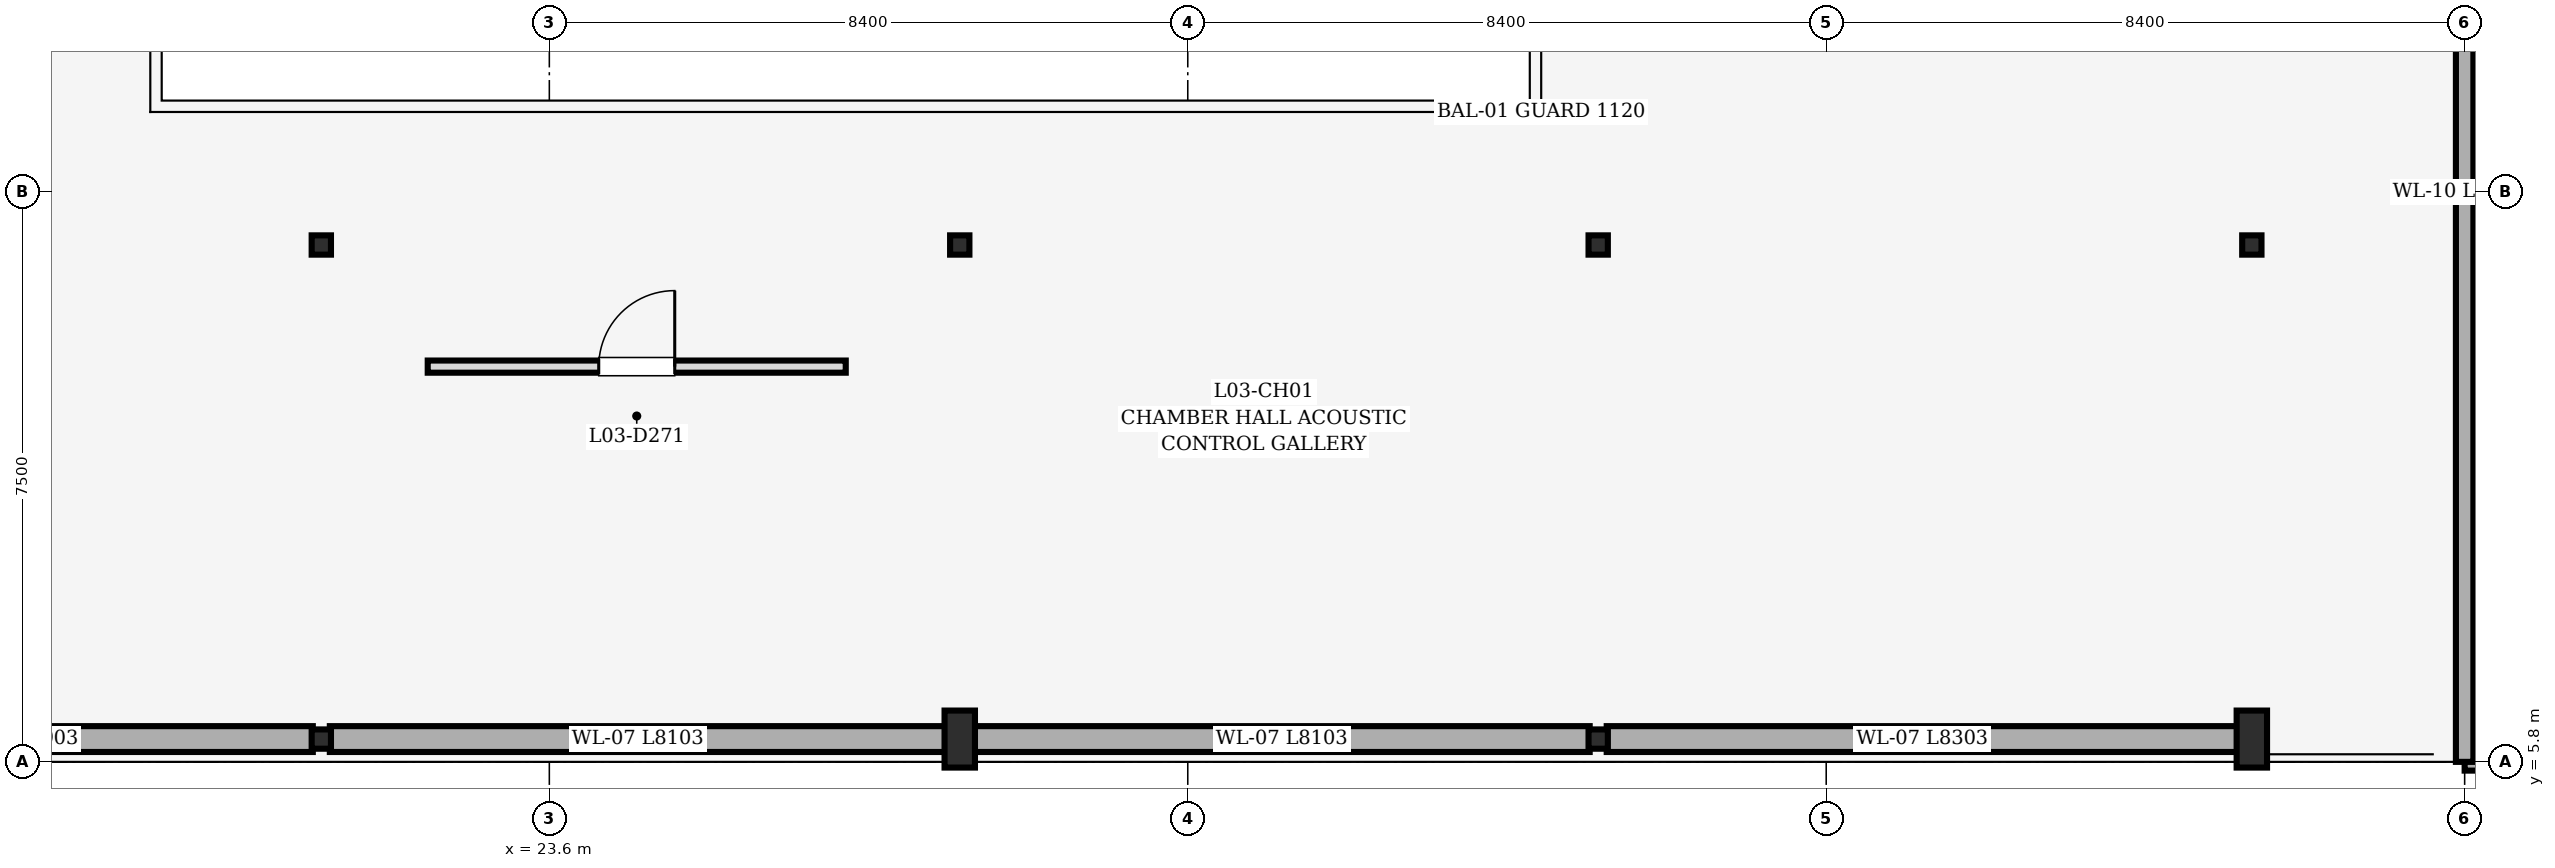
"""IFC4 building model, lengths in metres.
Left out: names, types, materials, properties, quantities, classifications, styles, units other than length and angle.
Written with IfcOpenShell. Run it as: python <this file> out.ifc"""

import sys

from ifc_helpers import new_model, si_unit, direction, frame, frame_2d, origin, origin_2d, place, context, subcontext, project, spatial, rectangle, i_section, extrude, element, fill, save


model = new_model("IFC4")
c1 = context("Model", 3, precision=1e-05, world=origin(), true_north=direction((0.0, 1.0)))
c2 = subcontext(c1, "Body", "Model", "MODEL_VIEW")
j1 = project(units=[si_unit("LENGTHUNIT", "METRE"), si_unit("PLANEANGLEUNIT", "RADIAN")], contexts=[c1])
p1 = place(None, origin())
s1 = spatial("IfcSite", under=j1, at=p1, CompositionType="ELEMENT")
p2 = place(p1, origin())
s2 = spatial("IfcBuilding", under=s1, at=p2, CompositionType="ELEMENT")
p3 = place(p2, frame((0.0, 0.0, 10.2)))
s3 = spatial("IfcBuildingStorey", under=s2, at=p3, CompositionType="ELEMENT", Elevation=10.2)
for number, where, z_axis, x_axis in (
    (1, (20.6, 6.1, 0.0), (0.0, 0.0, 1.0), (1.0, 0.0, 0.0)),
    (2, (20.6, 12.6, 0.0), (0.0, 0.0, 1.0), (1.0, 0.0, 0.0)),
):
    element("IfcColumn", number, at=place(p3, frame(where, z_axis=z_axis, x_axis=x_axis)), inside=s3, PredefinedType="COLUMN", context=c2, shape_type="SweptSolid", body=[
        extrude(i_section(OverallWidth=0.254, OverallDepth=0.254, WebThickness=0.009, FlangeThickness=0.014, at=origin_2d()), origin(), (0.0, 0.0, 1.0), 4.5),
    ])
p4 = place(p3, frame((29.0, 6.1, 0.0), z_axis=(0.0, 0.0, 1.0), x_axis=(1.0, 0.0, 0.0)))
e3 = element("IfcColumn", 3, at=p4, inside=s3, PredefinedType="PILASTER", context=c2, shape_type="SweptSolid", body=[
    extrude(rectangle(XDim=0.4, YDim=0.75, at=origin_2d()), origin(), (0.0, 0.0, 1.0), 4.5),
])
for number, where, z_axis, x_axis in (
    (4, (29.0, 12.6, 0.0), (0.0, 0.0, 1.0), (1.0, 0.0, 0.0)),
    (5, (37.4, 6.1, 0.0), (0.0, 0.0, 1.0), (1.0, 0.0, 0.0)),
    (6, (37.4, 12.6, 0.0), (0.0, 0.0, 1.0), (1.0, 0.0, 0.0)),
):
    element("IfcColumn", number, at=place(p3, frame(where, z_axis=z_axis, x_axis=x_axis)), inside=s3, PredefinedType="COLUMN", context=c2, shape_type="SweptSolid", body=[
        extrude(i_section(OverallWidth=0.254, OverallDepth=0.254, WebThickness=0.009, FlangeThickness=0.014, at=origin_2d()), origin(), (0.0, 0.0, 1.0), 4.5),
    ])
p5 = place(p3, frame((46.0, 6.1, 0.0), z_axis=(0.0, 0.0, 1.0), x_axis=(1.0, 0.0, 0.0)))
e7 = element("IfcColumn", 7, at=p5, inside=s3, PredefinedType="PILASTER", context=c2, shape_type="SweptSolid", body=[
    extrude(rectangle(XDim=0.4, YDim=0.75, at=origin_2d()), origin(), (0.0, 0.0, 1.0), 4.5),
])
p6 = place(p3, frame((46.0, 12.6, 0.0), z_axis=(0.0, 0.0, 1.0), x_axis=(1.0, 0.0, 0.0)))
e8 = element("IfcColumn", 8, at=p6, inside=s3, PredefinedType="COLUMN", context=c2, shape_type="SweptSolid", body=[
    extrude(i_section(OverallWidth=0.254, OverallDepth=0.254, WebThickness=0.009, FlangeThickness=0.014, at=origin_2d()), origin(), (0.0, 0.0, 1.0), 4.5),
])
p7 = place(p3, frame((20.488, 6.1, 0.0), z_axis=(0.0, 0.0, 1.0), x_axis=(-1.0, 0.0, 0.0)))
e9 = element("IfcWall", 9, at=p7, inside=s3, PredefinedType="STANDARD", context=c2, shape_type="SweptSolid", body=[
    extrude(rectangle(XDim=7.903, YDim=0.34, at=frame_2d((3.952, 0.0))), origin(), (0.0, 0.0, 1.0), 3.527),
])
p8 = place(p7, frame((3.376, 0.0, 0.85)))
e10 = element("IfcOpeningElement", 10, at=p8, cuts=e9, PredefinedType="OPENING", context=c2, shape_type="SweptSolid", body=[
    extrude(rectangle(XDim=1.15, YDim=1.95, at=frame_2d((0.575, 0.975))), frame((0.0, 0.182, 0.0), z_axis=(0.0, -1.0, 0.0), x_axis=(1.0, 0.0, 0.0)), (0.0, 0.0, 1.0), 0.364),
])
p9 = place(p3, frame((28.815, 6.1, 0.0), z_axis=(0.0, 0.0, 1.0), x_axis=(-1.0, 0.0, 0.0)))
e11 = element("IfcWall", 11, at=p9, inside=s3, PredefinedType="STANDARD", context=c2, shape_type="SweptSolid", body=[
    extrude(rectangle(XDim=8.103, YDim=0.34, at=frame_2d((4.052, 0.0))), origin(), (0.0, 0.0, 1.0), 3.477),
])
p10 = place(p9, frame((3.602, 0.0, 0.85)))
e12 = element("IfcOpeningElement", 12, at=p10, cuts=e11, PredefinedType="OPENING", context=c2, shape_type="SweptSolid", body=[
    extrude(rectangle(XDim=0.9, YDim=1.75, at=frame_2d((0.45, 0.875))), frame((0.0, 0.182, 0.0), z_axis=(0.0, -1.0, 0.0), x_axis=(1.0, 0.0, 0.0)), (0.0, 0.0, 1.0), 0.364),
])
p11 = place(p3, frame((37.288, 6.1, 0.0), z_axis=(0.0, 0.0, 1.0), x_axis=(-1.0, 0.0, 0.0)))
e13 = element("IfcWall", 13, at=p11, inside=s3, PredefinedType="STANDARD", context=c2, shape_type="SweptSolid", body=[
    extrude(rectangle(XDim=8.103, YDim=0.34, at=frame_2d((4.052, 0.0))), origin(), (0.0, 0.0, 1.0), 3.477),
])
p12 = place(p11, frame((3.491, 0.0, 0.85)))
e14 = element("IfcOpeningElement", 14, at=p12, cuts=e13, PredefinedType="OPENING", context=c2, shape_type="SweptSolid", body=[
    extrude(rectangle(XDim=1.12, YDim=1.75, at=frame_2d((0.56, 0.875))), frame((0.0, 0.182, 0.0), z_axis=(0.0, -1.0, 0.0), x_axis=(1.0, 0.0, 0.0)), (0.0, 0.0, 1.0), 0.364),
])
p13 = place(p3, frame((45.815, 6.1, 0.0), z_axis=(0.0, 0.0, 1.0), x_axis=(-1.0, 0.0, 0.0)))
e15 = element("IfcWall", 15, at=p13, inside=s3, PredefinedType="STANDARD", context=c2, shape_type="SweptSolid", body=[
    extrude(rectangle(XDim=8.303, YDim=0.34, at=frame_2d((4.151, 0.0))), origin(), (0.0, 0.0, 1.0), 3.477),
])
p14 = place(p13, frame((3.292, 0.0, 0.85)))
e16 = element("IfcOpeningElement", 16, at=p14, cuts=e15, PredefinedType="OPENING", context=c2, shape_type="SweptSolid", body=[
    extrude(rectangle(XDim=1.72, YDim=1.75, at=frame_2d((0.86, 0.875))), frame((0.0, 0.182, 0.0), z_axis=(0.0, -1.0, 0.0), x_axis=(1.0, 0.0, 0.0)), (0.0, 0.0, 1.0), 0.364),
])
p15 = place(p3, frame((96.0, 5.8, -0.12), z_axis=(0.0, 0.0, 1.0), x_axis=(-1.0, 0.0, 0.0)))
e17 = element("IfcWall", 17, at=p15, inside=s3, PredefinedType="PARAPET", context=c2, shape_type="SweptSolid", body=[
    extrude(rectangle(XDim=47.2, YDim=0.23, at=frame_2d((23.6, 0.0))), origin(), (0.0, 0.0, 1.0), 0.95),
])
p16 = place(p3, frame((48.8, 5.8, -0.12), z_axis=(0.0, 0.0, 1.0), x_axis=(0.0, 1.0, 0.0)))
e18 = element("IfcWall", 18, at=p16, inside=s3, PredefinedType="PARAPET", context=c2, shape_type="SweptSolid", body=[
    extrude(rectangle(XDim=15.0, YDim=0.23, at=frame_2d((7.5, 0.0))), origin(), (0.0, 0.0, 1.0), 0.95),
])
p17 = place(p3, frame((22.0, 11.0, 0.0), z_axis=(0.0, 0.0, 1.0), x_axis=(1.0, 0.0, 0.0)))
e19 = element("IfcWall", 19, at=p17, inside=s3, PredefinedType="PARTITIONING", context=c2, shape_type="SweptSolid", body=[
    extrude(rectangle(XDim=5.5, YDim=0.16, at=frame_2d((2.75, 0.0))), origin(), (0.0, 0.0, 1.0), 4.225),
])
p18 = place(p17, frame((2.25, 0.0, 0.0)))
e20 = element("IfcOpeningElement", 20, at=p18, cuts=e19, PredefinedType="OPENING", context=c2, shape_type="SweptSolid", body=[
    extrude(rectangle(XDim=1.0, YDim=2.2, at=frame_2d((0.5, 1.1))), frame((0.0, 0.092, 0.0), z_axis=(0.0, -1.0, 0.0), x_axis=(1.0, 0.0, 0.0)), (0.0, 0.0, 1.0), 0.184),
])
p19 = place(p8, origin())
e21 = element("IfcWindow", 21, at=p19, inside=s3, PartitioningType="DOUBLE_PANEL_VERTICAL", PredefinedType="WINDOW", context=c2, shape_type="SweptSolid", body=[
    extrude(rectangle(XDim=1.15, YDim=1.95, at=frame_2d((0.575, 0.975))), frame((0.0, 0.03, 0.0), z_axis=(0.0, -1.0, 0.0), x_axis=(1.0, 0.0, 0.0)), (0.0, 0.0, 1.0), 0.06),
])
fill(e10, e21)
p20 = place(p10, origin())
e22 = element("IfcWindow", 22, at=p20, inside=s3, PartitioningType="DOUBLE_PANEL_VERTICAL", PredefinedType="WINDOW", context=c2, shape_type="SweptSolid", body=[
    extrude(rectangle(XDim=0.9, YDim=1.75, at=frame_2d((0.45, 0.875))), frame((0.0, 0.03, 0.0), z_axis=(0.0, -1.0, 0.0), x_axis=(1.0, 0.0, 0.0)), (0.0, 0.0, 1.0), 0.06),
])
fill(e12, e22)
p21 = place(p12, origin())
e23 = element("IfcWindow", 23, at=p21, inside=s3, PartitioningType="DOUBLE_PANEL_VERTICAL", PredefinedType="WINDOW", context=c2, shape_type="SweptSolid", body=[
    extrude(rectangle(XDim=1.12, YDim=1.75, at=frame_2d((0.56, 0.875))), frame((0.0, 0.03, 0.0), z_axis=(0.0, -1.0, 0.0), x_axis=(1.0, 0.0, 0.0)), (0.0, 0.0, 1.0), 0.06),
])
fill(e14, e23)
p22 = place(p14, origin())
e24 = element("IfcWindow", 24, at=p22, inside=s3, PartitioningType="DOUBLE_PANEL_VERTICAL", PredefinedType="WINDOW", context=c2, shape_type="SweptSolid", body=[
    extrude(rectangle(XDim=1.72, YDim=1.75, at=frame_2d((0.86, 0.875))), frame((0.0, 0.03, 0.0), z_axis=(0.0, -1.0, 0.0), x_axis=(1.0, 0.0, 0.0)), (0.0, 0.0, 1.0), 0.06),
])
fill(e16, e24)
p23 = place(p18, origin())
e25 = element("IfcDoor", 25, at=p23, inside=s3, OperationType="SINGLE_SWING_RIGHT", PredefinedType="DOOR", context=c2, shape_type="SweptSolid", body=[
    extrude(rectangle(XDim=1.0, YDim=2.2, at=frame_2d((0.5, 1.1))), frame((0.0, 0.025, 0.0), z_axis=(0.0, -1.0, 0.0), x_axis=(1.0, 0.0, 0.0)), (0.0, 0.0, 1.0), 0.05),
])
fill(e20, e25)
save(model, sys.argv[1])
